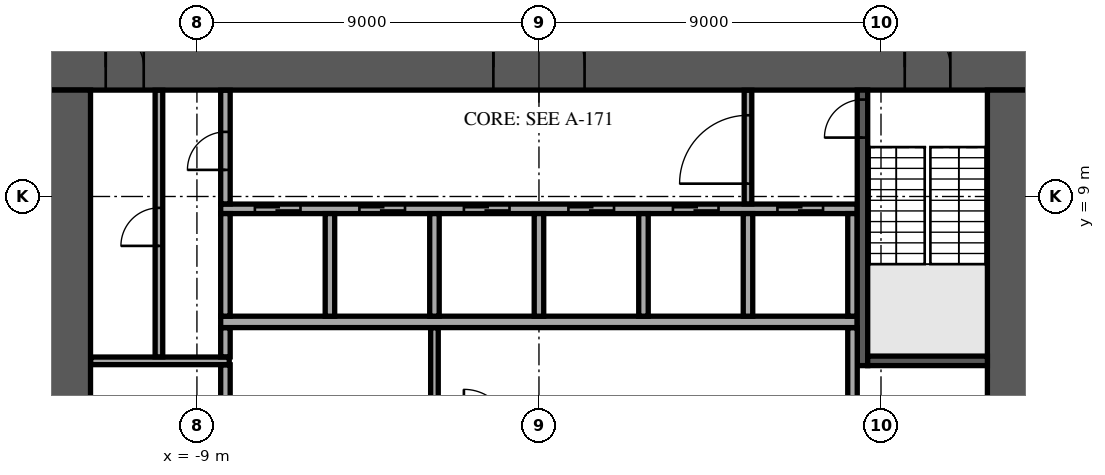
"""IFC4 building model, lengths in metres.
Left out: names, types, materials, properties, quantities, classifications, styles, units other than length and angle.
Written with IfcOpenShell. Run it as: python <this file> out.ifc"""

import sys

from ifc_helpers import new_model, si_unit, direction, frame, frame_2d, origin, place, context, subcontext, project, spatial, rectangle, extrude, element, fill, save


model = new_model("IFC4")
c1 = context("Model", 3, precision=1e-05, world=origin(), true_north=direction((0.0, 1.0)))
c2 = subcontext(c1, "Body", "Model", "MODEL_VIEW")
j1 = project(units=[si_unit("LENGTHUNIT", "METRE"), si_unit("PLANEANGLEUNIT", "RADIAN")], contexts=[c1])
p1 = place(None, origin())
s1 = spatial("IfcSite", under=j1, at=p1, CompositionType="ELEMENT")
p2 = place(p1, origin())
s2 = spatial("IfcBuilding", under=s1, at=p2, CompositionType="ELEMENT")
p3 = place(p2, frame((0.0, 0.0, 51.3)))
s3 = spatial("IfcBuildingStorey", under=s2, at=p3, CompositionType="ELEMENT", Elevation=51.3)
p4 = place(p3, frame((-13.0, 12.4, 0.0), z_axis=(0.0, 0.0, 1.0), x_axis=(1.0, 0.0, 0.0)))
e1 = element("IfcWall", 1, at=p4, inside=s3, PredefinedType="SHEAR", context=c2, shape_type="SweptSolid", body=[
    extrude(rectangle(XDim=26.0, YDim=1.2, at=frame_2d((13.0, 0.0))), origin(), (0.0, 0.0, 1.0), 3.75),
])
p5 = place(p4, frame((11.8, 0.0, 0.0)))
e2 = element("IfcOpeningElement", 2, at=p5, cuts=e1, PredefinedType="OPENING", context=c2, shape_type="SweptSolid", body=[
    extrude(rectangle(XDim=2.4, YDim=2.4, at=frame_2d((1.2, 1.2))), frame((0.0, 0.61, 0.0), z_axis=(0.0, -1.0, 0.0), x_axis=(1.0, 0.0, 0.0)), (0.0, 0.0, 1.0), 1.22),
])
p6 = place(p4, frame((22.625, 0.0, 0.0)))
e3 = element("IfcOpeningElement", 3, at=p6, cuts=e1, PredefinedType="OPENING", context=c2, shape_type="SweptSolid", body=[
    extrude(rectangle(XDim=1.2, YDim=2.1, at=frame_2d((0.6, 1.05))), frame((0.0, 0.61, 0.0), z_axis=(0.0, -1.0, 0.0), x_axis=(1.0, 0.0, 0.0)), (0.0, 0.0, 1.0), 1.22),
])
p7 = place(p4, frame((1.6, 0.0, 0.0)))
e4 = element("IfcOpeningElement", 4, at=p7, cuts=e1, PredefinedType="OPENING", context=c2, shape_type="SweptSolid", body=[
    extrude(rectangle(XDim=1.0, YDim=2.1, at=frame_2d((0.5, 1.05))), frame((0.0, 0.61, 0.0), z_axis=(0.0, -1.0, 0.0), x_axis=(1.0, 0.0, 0.0)), (0.0, 0.0, 1.0), 1.22),
])
p8 = place(p3, frame((12.4, -11.8, 0.0), z_axis=(0.0, 0.0, 1.0), x_axis=(0.0, 1.0, 0.0)))
e5 = element("IfcWall", 5, at=p8, inside=s3, PredefinedType="SHEAR", context=c2, shape_type="SweptSolid", body=[
    extrude(rectangle(XDim=23.6, YDim=1.2, at=frame_2d((11.8, 0.0))), origin(), (0.0, 0.0, 1.0), 3.75),
])
p9 = place(p8, frame((10.6, 0.0, 0.0)))
e6 = element("IfcOpeningElement", 6, at=p9, cuts=e5, PredefinedType="OPENING", context=c2, shape_type="SweptSolid", body=[
    extrude(rectangle(XDim=2.4, YDim=2.4, at=frame_2d((1.2, 1.2))), frame((0.0, 0.61, 0.0), z_axis=(0.0, -1.0, 0.0), x_axis=(1.0, 0.0, 0.0)), (0.0, 0.0, 1.0), 1.22),
])
p10 = place(p3, frame((-12.4, -11.8, 0.0), z_axis=(0.0, 0.0, 1.0), x_axis=(0.0, 1.0, 0.0)))
e7 = element("IfcWall", 7, at=p10, inside=s3, PredefinedType="SHEAR", context=c2, shape_type="SweptSolid", body=[
    extrude(rectangle(XDim=23.6, YDim=1.2, at=frame_2d((11.8, 0.0))), origin(), (0.0, 0.0, 1.0), 3.75),
])
p11 = place(p10, frame((10.6, 0.0, 0.0)))
e8 = element("IfcOpeningElement", 8, at=p11, cuts=e7, PredefinedType="OPENING", context=c2, shape_type="SweptSolid", body=[
    extrude(rectangle(XDim=2.4, YDim=2.4, at=frame_2d((1.2, 1.2))), frame((0.0, 0.61, 0.0), z_axis=(0.0, -1.0, 0.0), x_axis=(1.0, 0.0, 0.0)), (0.0, 0.0, 1.0), 1.22),
])
p12 = place(p3, frame((-8.375, 5.7, 0.0), z_axis=(0.0, 0.0, 1.0), x_axis=(1.0, 0.0, 0.0)))
e9 = element("IfcWall", 9, at=p12, inside=s3, PredefinedType="SOLIDWALL", context=c2, shape_type="SweptSolid", body=[
    extrude(rectangle(XDim=16.75, YDim=0.3, at=frame_2d((8.375, 0.0))), origin(), (0.0, 0.0, 1.0), 3.75),
])
p13 = place(p3, frame((-8.375, 8.675, 0.0), z_axis=(0.0, 0.0, 1.0), x_axis=(1.0, 0.0, 0.0)))
e10 = element("IfcWall", 10, at=p13, inside=s3, PredefinedType="SOLIDWALL", context=c2, shape_type="SweptSolid", body=[
    extrude(rectangle(XDim=16.75, YDim=0.25, at=frame_2d((8.375, 0.0))), origin(), (0.0, 0.0, 1.0), 3.75),
])
p14 = place(p13, frame((0.9, 0.0, 0.0)))
e11 = element("IfcOpeningElement", 11, at=p14, cuts=e10, PredefinedType="OPENING", context=c2, shape_type="SweptSolid", body=[
    extrude(rectangle(XDim=1.2, YDim=2.1, at=frame_2d((0.6, 1.05))), frame((0.0, 0.135, 0.0), z_axis=(0.0, -1.0, 0.0), x_axis=(1.0, 0.0, 0.0)), (0.0, 0.0, 1.0), 0.27),
])
p15 = place(p13, frame((3.65, 0.0, 0.0)))
e12 = element("IfcOpeningElement", 12, at=p15, cuts=e10, PredefinedType="OPENING", context=c2, shape_type="SweptSolid", body=[
    extrude(rectangle(XDim=1.2, YDim=2.1, at=frame_2d((0.6, 1.05))), frame((0.0, 0.135, 0.0), z_axis=(0.0, -1.0, 0.0), x_axis=(1.0, 0.0, 0.0)), (0.0, 0.0, 1.0), 0.27),
])
p16 = place(p13, frame((6.4, 0.0, 0.0)))
e13 = element("IfcOpeningElement", 13, at=p16, cuts=e10, PredefinedType="OPENING", context=c2, shape_type="SweptSolid", body=[
    extrude(rectangle(XDim=1.2, YDim=2.1, at=frame_2d((0.6, 1.05))), frame((0.0, 0.135, 0.0), z_axis=(0.0, -1.0, 0.0), x_axis=(1.0, 0.0, 0.0)), (0.0, 0.0, 1.0), 0.27),
])
p17 = place(p13, frame((9.15, 0.0, 0.0)))
e14 = element("IfcOpeningElement", 14, at=p17, cuts=e10, PredefinedType="OPENING", context=c2, shape_type="SweptSolid", body=[
    extrude(rectangle(XDim=1.2, YDim=2.1, at=frame_2d((0.6, 1.05))), frame((0.0, 0.135, 0.0), z_axis=(0.0, -1.0, 0.0), x_axis=(1.0, 0.0, 0.0)), (0.0, 0.0, 1.0), 0.27),
])
p18 = place(p13, frame((11.9, 0.0, 0.0)))
e15 = element("IfcOpeningElement", 15, at=p18, cuts=e10, PredefinedType="OPENING", context=c2, shape_type="SweptSolid", body=[
    extrude(rectangle(XDim=1.2, YDim=2.1, at=frame_2d((0.6, 1.05))), frame((0.0, 0.135, 0.0), z_axis=(0.0, -1.0, 0.0), x_axis=(1.0, 0.0, 0.0)), (0.0, 0.0, 1.0), 0.27),
])
p19 = place(p13, frame((14.65, 0.0, 0.0)))
e16 = element("IfcOpeningElement", 16, at=p19, cuts=e10, PredefinedType="OPENING", context=c2, shape_type="SweptSolid", body=[
    extrude(rectangle(XDim=1.2, YDim=2.1, at=frame_2d((0.6, 1.05))), frame((0.0, 0.135, 0.0), z_axis=(0.0, -1.0, 0.0), x_axis=(1.0, 0.0, 0.0)), (0.0, 0.0, 1.0), 0.27),
])
for number, where, z_axis, x_axis in (
    (17, (-8.25, 5.85, 0.0), (0.0, 0.0, 1.0), (0.0, 1.0, 0.0)),
    (18, (-5.5, 5.85, 0.0), (0.0, 0.0, 1.0), (0.0, 1.0, 0.0)),
    (19, (-2.75, 5.85, 0.0), (0.0, 0.0, 1.0), (0.0, 1.0, 0.0)),
    (20, (0.0, 5.85, 0.0), (0.0, 0.0, 1.0), (0.0, 1.0, 0.0)),
    (21, (2.75, 5.85, 0.0), (0.0, 0.0, 1.0), (0.0, 1.0, 0.0)),
    (22, (5.5, 5.85, 0.0), (0.0, 0.0, 1.0), (0.0, 1.0, 0.0)),
    (23, (8.25, 5.85, 0.0), (0.0, 0.0, 1.0), (0.0, 1.0, 0.0)),
):
    element("IfcWall", number, at=place(p3, frame(where, z_axis=z_axis, x_axis=x_axis)), inside=s3, PredefinedType="SOLIDWALL", context=c2, shape_type="SweptSolid", body=[
        extrude(rectangle(XDim=2.7, YDim=0.25, at=frame_2d((1.35, 0.0))), origin(), (0.0, 0.0, 1.0), 3.75),
    ])
p20 = place(p3, frame((8.512, 4.55, 0.0), z_axis=(0.0, 0.0, 1.0), x_axis=(0.0, 1.0, 0.0)))
e24 = element("IfcWall", 24, at=p20, inside=s3, PredefinedType="SOLIDWALL", context=c2, shape_type="SweptSolid", body=[
    extrude(rectangle(XDim=7.25, YDim=0.275, at=frame_2d((3.625, 0.0))), origin(), (0.0, 0.0, 1.0), 3.75),
])
p21 = place(p20, frame((6.0, 0.0, 0.0)))
e25 = element("IfcOpeningElement", 25, at=p21, cuts=e24, PredefinedType="OPENING", context=c2, shape_type="SweptSolid", body=[
    extrude(rectangle(XDim=1.0, YDim=2.1, at=frame_2d((0.5, 1.05))), frame((0.0, 0.147, 0.0), z_axis=(0.0, -1.0, 0.0), x_axis=(1.0, 0.0, 0.0)), (0.0, 0.0, 1.0), 0.295),
])
p22 = place(p3, frame((8.65, 4.675, 0.0), z_axis=(0.0, 0.0, 1.0), x_axis=(1.0, 0.0, 0.0)))
e26 = element("IfcWall", 26, at=p22, inside=s3, PredefinedType="SOLIDWALL", context=c2, shape_type="SweptSolid", body=[
    extrude(rectangle(XDim=3.15, YDim=0.25, at=frame_2d((1.575, 0.0))), origin(), (0.0, 0.0, 1.0), 3.75),
])
p23 = place(p3, frame((-8.25, 2.855, 0.0), z_axis=(0.0, 0.0, 1.0), x_axis=(0.0, 1.0, 0.0)))
e27 = element("IfcWall", 27, at=p23, inside=s3, PredefinedType="PARTITIONING", context=c2, shape_type="SweptSolid", body=[
    extrude(rectangle(XDim=1.715, YDim=0.25, at=frame_2d((0.857, 0.0))), origin(), (0.0, 0.0, 1.0), 3.75),
])
p24 = place(p3, frame((-2.75, 2.855, 0.0), z_axis=(0.0, 0.0, 1.0), x_axis=(0.0, 1.0, 0.0)))
e28 = element("IfcWall", 28, at=p24, inside=s3, PredefinedType="PARTITIONING", context=c2, shape_type="SweptSolid", body=[
    extrude(rectangle(XDim=2.69, YDim=0.2, at=frame_2d((1.345, 0.0))), origin(), (0.0, 0.0, 1.0), 3.75),
])
p25 = place(p3, frame((8.25, 2.855, 0.0), z_axis=(0.0, 0.0, 1.0), x_axis=(0.0, 1.0, 0.0)))
e29 = element("IfcWall", 29, at=p25, inside=s3, PredefinedType="PARTITIONING", context=c2, shape_type="SweptSolid", body=[
    extrude(rectangle(XDim=2.69, YDim=0.25, at=frame_2d((1.345, 0.0))), origin(), (0.0, 0.0, 1.0), 3.75),
])
p26 = place(p3, frame((-11.795, 4.675, 0.0), z_axis=(0.0, 0.0, 1.0), x_axis=(1.0, 0.0, 0.0)))
e30 = element("IfcWall", 30, at=p26, inside=s3, PredefinedType="PARTITIONING", context=c2, shape_type="SweptSolid", body=[
    extrude(rectangle(XDim=3.645, YDim=0.2, at=frame_2d((1.823, 0.0))), origin(), (0.0, 0.0, 1.0), 3.75),
])
p27 = place(p3, frame((-10.0, 4.78, 0.0), z_axis=(0.0, 0.0, 1.0), x_axis=(0.0, 1.0, 0.0)))
e31 = element("IfcWall", 31, at=p27, inside=s3, PredefinedType="PARTITIONING", context=c2, shape_type="SweptSolid", body=[
    extrude(rectangle(XDim=7.015, YDim=0.2, at=frame_2d((3.507, 0.0))), origin(), (0.0, 0.0, 1.0), 3.75),
])
p28 = place(p27, frame((2.92, 0.0, 0.0)))
e32 = element("IfcOpeningElement", 32, at=p28, cuts=e31, PredefinedType="OPENING", context=c2, shape_type="SweptSolid", body=[
    extrude(rectangle(XDim=1.0, YDim=2.1, at=frame_2d((0.5, 1.05))), frame((0.0, 0.11, 0.0), z_axis=(0.0, -1.0, 0.0), x_axis=(1.0, 0.0, 0.0)), (0.0, 0.0, 1.0), 0.22),
])
p29 = place(p3, frame((-8.25, 4.78, 0.0), z_axis=(0.0, 0.0, 1.0), x_axis=(0.0, 1.0, 0.0)))
e33 = element("IfcWall", 33, at=p29, inside=s3, PredefinedType="PARTITIONING", context=c2, shape_type="SweptSolid", body=[
    extrude(rectangle(XDim=0.765, YDim=0.25, at=frame_2d((0.382, 0.0))), origin(), (0.0, 0.0, 1.0), 3.75),
])
p30 = place(p3, frame((-8.25, 8.805, 0.0), z_axis=(0.0, 0.0, 1.0), x_axis=(0.0, 1.0, 0.0)))
e34 = element("IfcWall", 34, at=p30, inside=s3, PredefinedType="PARTITIONING", context=c2, shape_type="SweptSolid", body=[
    extrude(rectangle(XDim=2.99, YDim=0.25, at=frame_2d((1.495, 0.0))), origin(), (0.0, 0.0, 1.0), 3.75),
])
p31 = place(p30, frame((0.895, 0.0, 0.0)))
e35 = element("IfcOpeningElement", 35, at=p31, cuts=e34, PredefinedType="OPENING", context=c2, shape_type="SweptSolid", body=[
    extrude(rectangle(XDim=1.0, YDim=2.1, at=frame_2d((0.5, 1.05))), frame((0.0, 0.135, 0.0), z_axis=(0.0, -1.0, 0.0), x_axis=(1.0, 0.0, 0.0)), (0.0, 0.0, 1.0), 0.27),
])
p32 = place(p3, frame((5.5, 8.805, 0.0), z_axis=(0.0, 0.0, 1.0), x_axis=(0.0, 1.0, 0.0)))
e36 = element("IfcWall", 36, at=p32, inside=s3, PredefinedType="PARTITIONING", context=c2, shape_type="SweptSolid", body=[
    extrude(rectangle(XDim=2.99, YDim=0.2, at=frame_2d((1.495, 0.0))), origin(), (0.0, 0.0, 1.0), 3.75),
])
p33 = place(p32, frame((0.532, 0.0, 0.0)))
e37 = element("IfcOpeningElement", 37, at=p33, cuts=e36, PredefinedType="OPENING", context=c2, shape_type="SweptSolid", body=[
    extrude(rectangle(XDim=1.8, YDim=2.1, at=frame_2d((0.9, 1.05))), frame((0.0, 0.11, 0.0), z_axis=(0.0, -1.0, 0.0), x_axis=(1.0, 0.0, 0.0)), (0.0, 0.0, 1.0), 0.22),
])
p34 = place(p5, origin())
e38 = element("IfcDoor", 38, at=p34, inside=s3, OperationType="SINGLE_SWING_LEFT", PredefinedType="DOOR", context=c2, shape_type="SweptSolid", body=[
    extrude(rectangle(XDim=2.4, YDim=2.4, at=frame_2d((1.2, 1.2))), frame((0.0, 0.025, 0.0), z_axis=(0.0, -1.0, 0.0), x_axis=(1.0, 0.0, 0.0)), (0.0, 0.0, 1.0), 0.05),
])
fill(e2, e38)
p35 = place(p6, origin())
e39 = element("IfcDoor", 39, at=p35, inside=s3, OperationType="SINGLE_SWING_LEFT", PredefinedType="DOOR", context=c2, shape_type="SweptSolid", body=[
    extrude(rectangle(XDim=1.2, YDim=2.1, at=frame_2d((0.6, 1.05))), frame((0.0, 0.025, 0.0), z_axis=(0.0, -1.0, 0.0), x_axis=(1.0, 0.0, 0.0)), (0.0, 0.0, 1.0), 0.05),
])
fill(e3, e39)
p36 = place(p7, origin())
e40 = element("IfcDoor", 40, at=p36, inside=s3, OperationType="SINGLE_SWING_LEFT", PredefinedType="DOOR", context=c2, shape_type="SweptSolid", body=[
    extrude(rectangle(XDim=1.0, YDim=2.1, at=frame_2d((0.5, 1.05))), frame((0.0, 0.025, 0.0), z_axis=(0.0, -1.0, 0.0), x_axis=(1.0, 0.0, 0.0)), (0.0, 0.0, 1.0), 0.05),
])
fill(e4, e40)
p37 = place(p14, origin())
e41 = element("IfcDoor", 41, at=p37, inside=s3, OperationType="DOUBLE_DOOR_SLIDING", PredefinedType="DOOR", context=c2, shape_type="SweptSolid", body=[
    extrude(rectangle(XDim=1.2, YDim=2.1, at=frame_2d((0.6, 1.05))), frame((0.0, 0.025, 0.0), z_axis=(0.0, -1.0, 0.0), x_axis=(1.0, 0.0, 0.0)), (0.0, 0.0, 1.0), 0.05),
])
fill(e11, e41)
p38 = place(p15, origin())
e42 = element("IfcDoor", 42, at=p38, inside=s3, OperationType="DOUBLE_DOOR_SLIDING", PredefinedType="DOOR", context=c2, shape_type="SweptSolid", body=[
    extrude(rectangle(XDim=1.2, YDim=2.1, at=frame_2d((0.6, 1.05))), frame((0.0, 0.025, 0.0), z_axis=(0.0, -1.0, 0.0), x_axis=(1.0, 0.0, 0.0)), (0.0, 0.0, 1.0), 0.05),
])
fill(e12, e42)
p39 = place(p16, origin())
e43 = element("IfcDoor", 43, at=p39, inside=s3, OperationType="DOUBLE_DOOR_SLIDING", PredefinedType="DOOR", context=c2, shape_type="SweptSolid", body=[
    extrude(rectangle(XDim=1.2, YDim=2.1, at=frame_2d((0.6, 1.05))), frame((0.0, 0.025, 0.0), z_axis=(0.0, -1.0, 0.0), x_axis=(1.0, 0.0, 0.0)), (0.0, 0.0, 1.0), 0.05),
])
fill(e13, e43)
p40 = place(p17, origin())
e44 = element("IfcDoor", 44, at=p40, inside=s3, OperationType="DOUBLE_DOOR_SLIDING", PredefinedType="DOOR", context=c2, shape_type="SweptSolid", body=[
    extrude(rectangle(XDim=1.2, YDim=2.1, at=frame_2d((0.6, 1.05))), frame((0.0, 0.025, 0.0), z_axis=(0.0, -1.0, 0.0), x_axis=(1.0, 0.0, 0.0)), (0.0, 0.0, 1.0), 0.05),
])
fill(e14, e44)
p41 = place(p18, origin())
e45 = element("IfcDoor", 45, at=p41, inside=s3, OperationType="DOUBLE_DOOR_SLIDING", PredefinedType="DOOR", context=c2, shape_type="SweptSolid", body=[
    extrude(rectangle(XDim=1.2, YDim=2.1, at=frame_2d((0.6, 1.05))), frame((0.0, 0.025, 0.0), z_axis=(0.0, -1.0, 0.0), x_axis=(1.0, 0.0, 0.0)), (0.0, 0.0, 1.0), 0.05),
])
fill(e15, e45)
p42 = place(p19, origin())
e46 = element("IfcDoor", 46, at=p42, inside=s3, OperationType="DOUBLE_DOOR_SLIDING", PredefinedType="DOOR", context=c2, shape_type="SweptSolid", body=[
    extrude(rectangle(XDim=1.2, YDim=2.1, at=frame_2d((0.6, 1.05))), frame((0.0, 0.025, 0.0), z_axis=(0.0, -1.0, 0.0), x_axis=(1.0, 0.0, 0.0)), (0.0, 0.0, 1.0), 0.05),
])
fill(e16, e46)
p43 = place(p21, origin())
e47 = element("IfcDoor", 47, at=p43, inside=s3, OperationType="SINGLE_SWING_LEFT", PredefinedType="DOOR", context=c2, shape_type="SweptSolid", body=[
    extrude(rectangle(XDim=1.0, YDim=2.1, at=frame_2d((0.5, 1.05))), frame((0.0, 0.025, 0.0), z_axis=(0.0, -1.0, 0.0), x_axis=(1.0, 0.0, 0.0)), (0.0, 0.0, 1.0), 0.05),
])
fill(e25, e47)
p44 = place(p28, origin())
e48 = element("IfcDoor", 48, at=p44, inside=s3, OperationType="SINGLE_SWING_RIGHT", PredefinedType="DOOR", context=c2, shape_type="SweptSolid", body=[
    extrude(rectangle(XDim=1.0, YDim=2.1, at=frame_2d((0.5, 1.05))), frame((0.0, 0.025, 0.0), z_axis=(0.0, -1.0, 0.0), x_axis=(1.0, 0.0, 0.0)), (0.0, 0.0, 1.0), 0.05),
])
fill(e32, e48)
p45 = place(p31, origin())
e49 = element("IfcDoor", 49, at=p45, inside=s3, OperationType="SINGLE_SWING_RIGHT", PredefinedType="DOOR", context=c2, shape_type="SweptSolid", body=[
    extrude(rectangle(XDim=1.0, YDim=2.1, at=frame_2d((0.5, 1.05))), frame((0.0, 0.025, 0.0), z_axis=(0.0, -1.0, 0.0), x_axis=(1.0, 0.0, 0.0)), (0.0, 0.0, 1.0), 0.05),
])
fill(e35, e49)
p46 = place(p33, origin())
e50 = element("IfcDoor", 50, at=p46, inside=s3, OperationType="SINGLE_SWING_LEFT", PredefinedType="DOOR", context=c2, shape_type="SweptSolid", body=[
    extrude(rectangle(XDim=1.8, YDim=2.1, at=frame_2d((0.9, 1.05))), frame((0.0, 0.025, 0.0), z_axis=(0.0, -1.0, 0.0), x_axis=(1.0, 0.0, 0.0)), (0.0, 0.0, 1.0), 0.05),
])
fill(e37, e50)
save(model, sys.argv[1])
